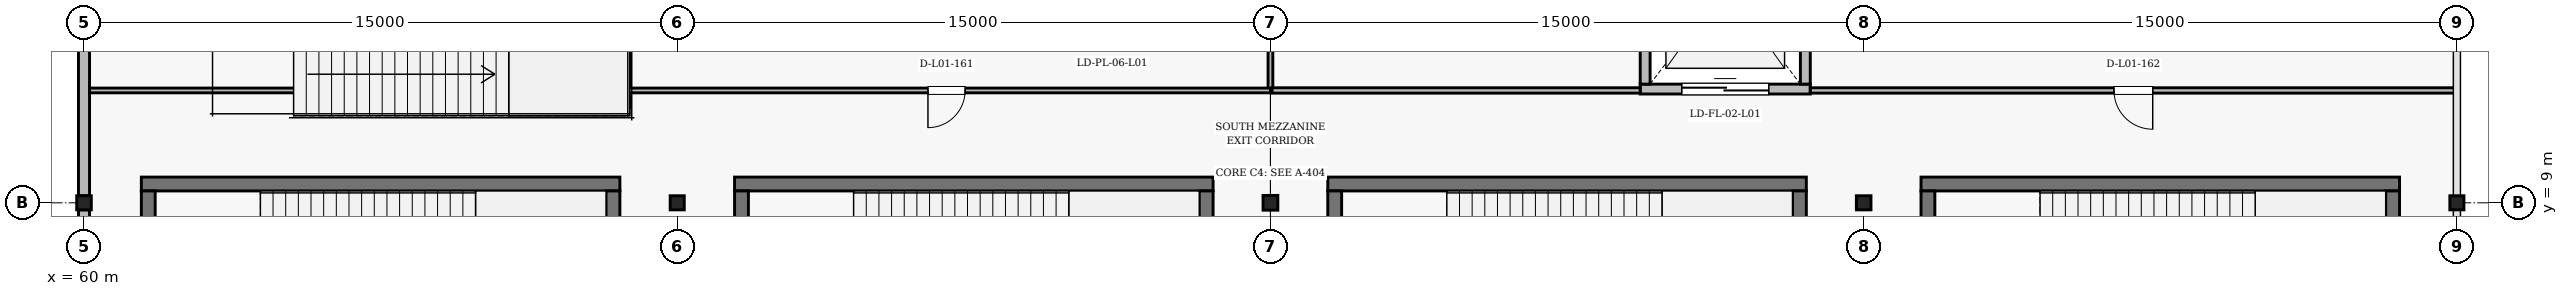
"""IFC4 building model, lengths in metres.
Left out: names, types, materials, properties, quantities, classifications, styles, units other than length and angle.
Written with IfcOpenShell. Run it as: python <this file> out.ifc"""

import sys

from ifc_helpers import new_model, si_unit, direction, frame, frame_2d, origin, origin_2d, place, context, subcontext, project, spatial, rectangle, hollow_circle, i_section, extrude, element, fill, save


model = new_model("IFC4")
c1 = context("Model", 3, precision=1e-05, world=origin(), true_north=direction((0.0, 1.0)))
c2 = subcontext(c1, "Body", "Model", "MODEL_VIEW")
j1 = project(units=[si_unit("LENGTHUNIT", "METRE"), si_unit("PLANEANGLEUNIT", "RADIAN")], contexts=[c1])
p1 = place(None, origin())
s1 = spatial("IfcSite", under=j1, at=p1, CompositionType="ELEMENT")
p2 = place(p1, origin())
s2 = spatial("IfcBuilding", under=s1, at=p2, CompositionType="ELEMENT")
p3 = place(p2, frame((0.0, 0.0, 5.4)))
s3 = spatial("IfcBuildingStorey", under=s2, at=p3, CompositionType="ELEMENT", Elevation=5.4)
p4 = place(p3, frame((60.0, 9.0, 0.0), z_axis=(0.0, 0.0, 1.0), x_axis=(1.0, 0.0, 0.0)))
e1 = element("IfcColumn", 1, at=p4, inside=s3, PredefinedType="COLUMN", context=c2, shape_type="SweptSolid", body=[
    extrude(i_section(OverallWidth=0.369, OverallDepth=0.356, WebThickness=0.011, FlangeThickness=0.018, FilletRadius=0.015, at=origin_2d()), origin(), (0.0, 0.0, 1.0), 5.4),
])
p5 = place(p3, frame((75.0, 9.0, 0.0), z_axis=(0.0, 0.0, 1.0), x_axis=(1.0, 0.0, 0.0)))
e2 = element("IfcColumn", 2, at=p5, inside=s3, PredefinedType="COLUMN", context=c2, shape_type="SweptSolid", body=[
    extrude(hollow_circle(Radius=0.178, WallThickness=0.016, at=origin_2d()), origin(), (0.0, 0.0, 1.0), 5.4),
])
p6 = place(p3, frame((90.0, 9.0, 0.0), z_axis=(0.0, 0.0, 1.0), x_axis=(1.0, 0.0, 0.0)))
e3 = element("IfcColumn", 3, at=p6, inside=s3, PredefinedType="COLUMN", context=c2, shape_type="SweptSolid", body=[
    extrude(i_section(OverallWidth=0.374, OverallDepth=0.372, WebThickness=0.016, FlangeThickness=0.026, FilletRadius=0.016, at=origin_2d()), origin(), (0.0, 0.0, 1.0), 5.4),
])
p7 = place(p3, frame((105.0, 9.0, 0.0), z_axis=(0.0, 0.0, 1.0), x_axis=(1.0, 0.0, 0.0)))
e4 = element("IfcColumn", 4, at=p7, inside=s3, PredefinedType="COLUMN", context=c2, shape_type="SweptSolid", body=[
    extrude(i_section(OverallWidth=0.369, OverallDepth=0.356, WebThickness=0.011, FlangeThickness=0.018, FilletRadius=0.015, at=origin_2d()), origin(), (0.0, 0.0, 1.0), 5.4),
])
p8 = place(p3, frame((120.0, 9.0, 0.0), z_axis=(0.0, 0.0, 1.0), x_axis=(1.0, 0.0, 0.0)))
e5 = element("IfcColumn", 5, at=p8, inside=s3, PredefinedType="COLUMN", context=c2, shape_type="SweptSolid", body=[
    extrude(hollow_circle(Radius=0.178, WallThickness=0.016, at=origin_2d()), origin(), (0.0, 0.0, 1.0), 5.4),
])
p9 = place(p3, frame((60.0, 0.186, 0.0), z_axis=(0.0, 0.0, 1.0), x_axis=(0.0, 1.0, 0.0)))
e6 = element("IfcWall", 6, at=p9, inside=s3, PredefinedType="SOLIDWALL", context=c2, shape_type="SweptSolid", body=[
    extrude(rectangle(XDim=8.636, YDim=0.28, at=frame_2d((4.318, 0.0))), origin(), (0.0, 0.0, 1.0), 4.392),
])
p10 = place(p3, frame((60.0, 9.178, 0.0), z_axis=(0.0, 0.0, 1.0), x_axis=(0.0, 1.0, 0.0)))
e7 = element("IfcWall", 7, at=p10, inside=s3, PredefinedType="SOLIDWALL", context=c2, shape_type="SweptSolid", body=[
    extrude(rectangle(XDim=8.347, YDim=0.28, at=frame_2d((4.173, 0.0))), origin(), (0.0, 0.0, 1.0), 4.47),
])
p11 = place(p3, frame((73.55, 9.475, 0.0), z_axis=(0.0, 0.0, 1.0), x_axis=(-1.0, 0.0, 0.0)))
e8 = element("IfcWall", 8, at=p11, inside=s3, PredefinedType="SHEAR", context=c2, shape_type="SweptSolid", body=[
    extrude(rectangle(XDim=12.1, YDim=0.35, at=frame_2d((6.05, 0.0))), origin(), (0.0, 0.0, 1.0), 5.18),
])
p12 = place(p3, frame((61.625, 9.3, 0.0), z_axis=(0.0, 0.0, 1.0), x_axis=(0.0, -1.0, 0.0)))
e9 = element("IfcWall", 9, at=p12, inside=s3, PredefinedType="SHEAR", context=c2, shape_type="SweptSolid", body=[
    extrude(rectangle(XDim=5.5, YDim=0.35, at=frame_2d((2.75, 0.0))), origin(), (0.0, 0.0, 1.0), 5.18),
])
p13 = place(p12, frame((1.85, 0.0, 0.0)))
e10 = element("IfcOpeningElement", 10, at=p13, cuts=e9, PredefinedType="OPENING", context=c2, shape_type="SweptSolid", body=[
    extrude(rectangle(XDim=1.8, YDim=2.2, at=frame_2d((0.9, 1.1))), frame((0.0, 0.185, 0.0), z_axis=(0.0, -1.0, 0.0), x_axis=(1.0, 0.0, 0.0)), (0.0, 0.0, 1.0), 0.37),
])
p14 = place(p3, frame((73.375, 3.8, 0.0), z_axis=(0.0, 0.0, 1.0), x_axis=(0.0, 1.0, 0.0)))
e11 = element("IfcWall", 11, at=p14, inside=s3, PredefinedType="SHEAR", context=c2, shape_type="SweptSolid", body=[
    extrude(rectangle(XDim=5.5, YDim=0.35, at=frame_2d((2.75, 0.0))), origin(), (0.0, 0.0, 1.0), 5.18),
])
p15 = place(p3, frame((88.55, 9.475, 0.0), z_axis=(0.0, 0.0, 1.0), x_axis=(-1.0, 0.0, 0.0)))
e12 = element("IfcWall", 12, at=p15, inside=s3, PredefinedType="SHEAR", context=c2, shape_type="SweptSolid", body=[
    extrude(rectangle(XDim=12.1, YDim=0.35, at=frame_2d((6.05, 0.0))), origin(), (0.0, 0.0, 1.0), 5.18),
])
p16 = place(p3, frame((76.625, 9.3, 0.0), z_axis=(0.0, 0.0, 1.0), x_axis=(0.0, -1.0, 0.0)))
e13 = element("IfcWall", 13, at=p16, inside=s3, PredefinedType="SHEAR", context=c2, shape_type="SweptSolid", body=[
    extrude(rectangle(XDim=5.5, YDim=0.35, at=frame_2d((2.75, 0.0))), origin(), (0.0, 0.0, 1.0), 5.18),
])
p17 = place(p16, frame((1.85, 0.0, 0.0)))
e14 = element("IfcOpeningElement", 14, at=p17, cuts=e13, PredefinedType="OPENING", context=c2, shape_type="SweptSolid", body=[
    extrude(rectangle(XDim=1.8, YDim=2.2, at=frame_2d((0.9, 1.1))), frame((0.0, 0.185, 0.0), z_axis=(0.0, -1.0, 0.0), x_axis=(1.0, 0.0, 0.0)), (0.0, 0.0, 1.0), 0.37),
])
p18 = place(p3, frame((88.375, 3.8, 0.0), z_axis=(0.0, 0.0, 1.0), x_axis=(0.0, 1.0, 0.0)))
e15 = element("IfcWall", 15, at=p18, inside=s3, PredefinedType="SHEAR", context=c2, shape_type="SweptSolid", body=[
    extrude(rectangle(XDim=5.5, YDim=0.35, at=frame_2d((2.75, 0.0))), origin(), (0.0, 0.0, 1.0), 5.18),
])
p19 = place(p3, frame((103.55, 9.475, 0.0), z_axis=(0.0, 0.0, 1.0), x_axis=(-1.0, 0.0, 0.0)))
e16 = element("IfcWall", 16, at=p19, inside=s3, PredefinedType="SHEAR", context=c2, shape_type="SweptSolid", body=[
    extrude(rectangle(XDim=12.1, YDim=0.35, at=frame_2d((6.05, 0.0))), origin(), (0.0, 0.0, 1.0), 5.18),
])
p20 = place(p3, frame((91.625, 9.3, 0.0), z_axis=(0.0, 0.0, 1.0), x_axis=(0.0, -1.0, 0.0)))
e17 = element("IfcWall", 17, at=p20, inside=s3, PredefinedType="SHEAR", context=c2, shape_type="SweptSolid", body=[
    extrude(rectangle(XDim=5.5, YDim=0.35, at=frame_2d((2.75, 0.0))), origin(), (0.0, 0.0, 1.0), 5.18),
])
p21 = place(p20, frame((1.85, 0.0, 0.0)))
e18 = element("IfcOpeningElement", 18, at=p21, cuts=e17, PredefinedType="OPENING", context=c2, shape_type="SweptSolid", body=[
    extrude(rectangle(XDim=1.8, YDim=2.2, at=frame_2d((0.9, 1.1))), frame((0.0, 0.185, 0.0), z_axis=(0.0, -1.0, 0.0), x_axis=(1.0, 0.0, 0.0)), (0.0, 0.0, 1.0), 0.37),
])
p22 = place(p3, frame((103.375, 3.8, 0.0), z_axis=(0.0, 0.0, 1.0), x_axis=(0.0, 1.0, 0.0)))
e19 = element("IfcWall", 19, at=p22, inside=s3, PredefinedType="SHEAR", context=c2, shape_type="SweptSolid", body=[
    extrude(rectangle(XDim=5.5, YDim=0.35, at=frame_2d((2.75, 0.0))), origin(), (0.0, 0.0, 1.0), 5.18),
])
p23 = place(p3, frame((118.55, 9.475, 0.0), z_axis=(0.0, 0.0, 1.0), x_axis=(-1.0, 0.0, 0.0)))
e20 = element("IfcWall", 20, at=p23, inside=s3, PredefinedType="SHEAR", context=c2, shape_type="SweptSolid", body=[
    extrude(rectangle(XDim=12.1, YDim=0.35, at=frame_2d((6.05, 0.0))), origin(), (0.0, 0.0, 1.0), 5.18),
])
p24 = place(p3, frame((106.625, 9.3, 0.0), z_axis=(0.0, 0.0, 1.0), x_axis=(0.0, -1.0, 0.0)))
e21 = element("IfcWall", 21, at=p24, inside=s3, PredefinedType="SHEAR", context=c2, shape_type="SweptSolid", body=[
    extrude(rectangle(XDim=5.5, YDim=0.35, at=frame_2d((2.75, 0.0))), origin(), (0.0, 0.0, 1.0), 5.18),
])
p25 = place(p24, frame((1.85, 0.0, 0.0)))
e22 = element("IfcOpeningElement", 22, at=p25, cuts=e21, PredefinedType="OPENING", context=c2, shape_type="SweptSolid", body=[
    extrude(rectangle(XDim=1.8, YDim=2.2, at=frame_2d((0.9, 1.1))), frame((0.0, 0.185, 0.0), z_axis=(0.0, -1.0, 0.0), x_axis=(1.0, 0.0, 0.0)), (0.0, 0.0, 1.0), 0.37),
])
p26 = place(p3, frame((118.375, 3.8, 0.0), z_axis=(0.0, 0.0, 1.0), x_axis=(0.0, 1.0, 0.0)))
e23 = element("IfcWall", 23, at=p26, inside=s3, PredefinedType="SHEAR", context=c2, shape_type="SweptSolid", body=[
    extrude(rectangle(XDim=5.5, YDim=0.35, at=frame_2d((2.75, 0.0))), origin(), (0.0, 0.0, 1.0), 5.18),
])
p27 = place(p3, frame((70.82, 11.4, 0.0), z_axis=(0.0, 0.0, 1.0), x_axis=(1.0, 0.0, 0.0)))
e24 = element("IfcWall", 24, at=p27, inside=s3, PredefinedType="SHEAR", context=c2, shape_type="SweptSolid", body=[
    extrude(rectangle(XDim=2.8, YDim=0.35, at=frame_2d((1.4, 0.0))), origin(), (0.0, 0.0, 1.0), 2.5),
])
p28 = place(p3, frame((73.62, 11.4, 0.0), z_axis=(0.0, 0.0, 1.0), x_axis=(0.0, 1.0, 0.0)))
e25 = element("IfcWall", 25, at=p28, inside=s3, PredefinedType="SHEAR", context=c2, shape_type="SweptSolid", body=[
    extrude(rectangle(XDim=3.98, YDim=0.35, at=frame_2d((1.99, 0.0))), origin(), (0.0, 0.0, 1.0), 2.5),
])
p29 = place(p3, frame((99.35, 11.875, 0.0), z_axis=(0.0, 0.0, 1.0), x_axis=(1.0, 0.0, 0.0)))
e26 = element("IfcWall", 26, at=p29, inside=s3, PredefinedType="SOLIDWALL", context=c2, shape_type="SweptSolid", body=[
    extrude(rectangle(XDim=4.3, YDim=0.25, at=frame_2d((2.15, 0.0))), origin(), (0.0, 0.0, 1.0), 5.16),
])
p30 = place(p29, frame((1.05, 0.0, 0.0)))
e27 = element("IfcOpeningElement", 27, at=p30, cuts=e26, PredefinedType="OPENING", context=c2, shape_type="SweptSolid", body=[
    extrude(rectangle(XDim=2.2, YDim=2.5, at=frame_2d((1.1, 1.25))), frame((0.0, 0.135, 0.0), z_axis=(0.0, -1.0, 0.0), x_axis=(1.0, 0.0, 0.0)), (0.0, 0.0, 1.0), 0.27),
])
for number, where, z_axis, x_axis in (
    (28, (99.475, 17.0, 0.0), (0.0, 0.0, 1.0), (0.0, -1.0, 0.0)),
    (29, (103.525, 12.0, 0.0), (0.0, 0.0, 1.0), (0.0, 1.0, 0.0)),
):
    element("IfcWall", number, at=place(p3, frame(where, z_axis=z_axis, x_axis=x_axis)), inside=s3, PredefinedType="SOLIDWALL", context=c2, shape_type="SweptSolid", body=[
        extrude(rectangle(XDim=5.0, YDim=0.25, at=frame_2d((2.5, 0.0))), origin(), (0.0, 0.0, 1.0), 5.16),
    ])
p31 = place(p3, frame((90.0, 17.79, 0.0), z_axis=(0.0, 0.0, 1.0), x_axis=(0.0, -1.0, 0.0)))
e30 = element("IfcWall", 30, at=p31, inside=s3, PredefinedType="PARTITIONING", context=c2, shape_type="SweptSolid", body=[
    extrude(rectangle(XDim=5.95, YDim=0.12, at=frame_2d((2.975, 0.0))), origin(), (0.0, 0.0, 1.0), 4.554),
])
p32 = place(p3, frame((90.0, 11.84, 0.0), z_axis=(0.0, 0.0, 1.0), x_axis=(-1.0, 0.0, 0.0)))
e31 = element("IfcWall", 31, at=p32, inside=s3, PredefinedType="PARTITIONING", context=c2, shape_type="SweptSolid", body=[
    extrude(rectangle(XDim=16.38, YDim=0.12, at=frame_2d((8.19, 0.0))), origin(), (0.0, 0.0, 1.0), 4.481),
])
p33 = place(p32, frame((7.72, 0.0, 0.0)))
e32 = element("IfcOpeningElement", 32, at=p33, cuts=e31, PredefinedType="OPENING", context=c2, shape_type="SweptSolid", body=[
    extrude(rectangle(XDim=0.94, YDim=2.15, at=frame_2d((0.47, 1.075))), frame((0.0, 0.07, 0.0), z_axis=(0.0, -1.0, 0.0), x_axis=(1.0, 0.0, 0.0)), (0.0, 0.0, 1.0), 0.14),
])
p34 = place(p3, frame((70.82, 11.84, 0.0), z_axis=(0.0, 0.0, 1.0), x_axis=(-1.0, 0.0, 0.0)))
e33 = element("IfcWall", 33, at=p34, inside=s3, PredefinedType="PARTITIONING", context=c2, shape_type="SweptSolid", body=[
    extrude(rectangle(XDim=10.68, YDim=0.12, at=frame_2d((5.34, 0.0))), origin(), (0.0, 0.0, 1.0), 4.47),
])
p35 = place(p3, frame((119.988, 11.84, 0.0), z_axis=(0.0, 0.0, 1.0), x_axis=(-1.0, 0.0, 0.0)))
e34 = element("IfcWall", 34, at=p35, inside=s3, PredefinedType="PARTITIONING", context=c2, shape_type="SweptSolid", body=[
    extrude(rectangle(XDim=16.338, YDim=0.135, at=frame_2d((8.169, 0.0))), origin(), (0.0, 0.0, 1.0), 4.392),
])
p36 = place(p35, frame((7.679, 0.0, 0.0)))
e35 = element("IfcOpeningElement", 35, at=p36, cuts=e34, PredefinedType="OPENING", context=c2, shape_type="SweptSolid", body=[
    extrude(rectangle(XDim=0.98, YDim=2.15, at=frame_2d((0.49, 1.075))), frame((0.0, 0.078, 0.0), z_axis=(0.0, -1.0, 0.0), x_axis=(1.0, 0.0, 0.0)), (0.0, 0.0, 1.0), 0.155),
])
p37 = place(p3, frame((99.35, 11.84, 0.0), z_axis=(0.0, 0.0, 1.0), x_axis=(-1.0, 0.0, 0.0)))
e36 = element("IfcWall", 36, at=p37, inside=s3, PredefinedType="PARTITIONING", context=c2, shape_type="SweptSolid", body=[
    extrude(rectangle(XDim=9.31, YDim=0.135, at=frame_2d((4.655, 0.0))), origin(), (0.0, 0.0, 1.0), 4.554),
])
p38 = place(p30, origin())
e37 = element("IfcDoor", 37, at=p38, inside=s3, OperationType="DOUBLE_DOOR_SLIDING", PredefinedType="DOOR", context=c2, shape_type="SweptSolid", body=[
    extrude(rectangle(XDim=2.2, YDim=2.5, at=frame_2d((1.1, 1.25))), frame((0.0, 0.025, 0.0), z_axis=(0.0, -1.0, 0.0), x_axis=(1.0, 0.0, 0.0)), (0.0, 0.0, 1.0), 0.05),
])
fill(e27, e37)
p39 = place(p33, origin())
e38 = element("IfcDoor", 38, at=p39, inside=s3, OperationType="SINGLE_SWING_RIGHT", PredefinedType="DOOR", context=c2, shape_type="SweptSolid", body=[
    extrude(rectangle(XDim=0.94, YDim=2.15, at=frame_2d((0.47, 1.075))), frame((0.0, 0.025, 0.0), z_axis=(0.0, -1.0, 0.0), x_axis=(1.0, 0.0, 0.0)), (0.0, 0.0, 1.0), 0.05),
])
fill(e32, e38)
p40 = place(p36, origin())
e39 = element("IfcDoor", 39, at=p40, inside=s3, OperationType="SINGLE_SWING_LEFT", PredefinedType="DOOR", context=c2, shape_type="SweptSolid", body=[
    extrude(rectangle(XDim=0.98, YDim=2.15, at=frame_2d((0.49, 1.075))), frame((0.0, 0.025, 0.0), z_axis=(0.0, -1.0, 0.0), x_axis=(1.0, 0.0, 0.0)), (0.0, 0.0, 1.0), 0.05),
])
fill(e35, e39)
save(model, sys.argv[1])
